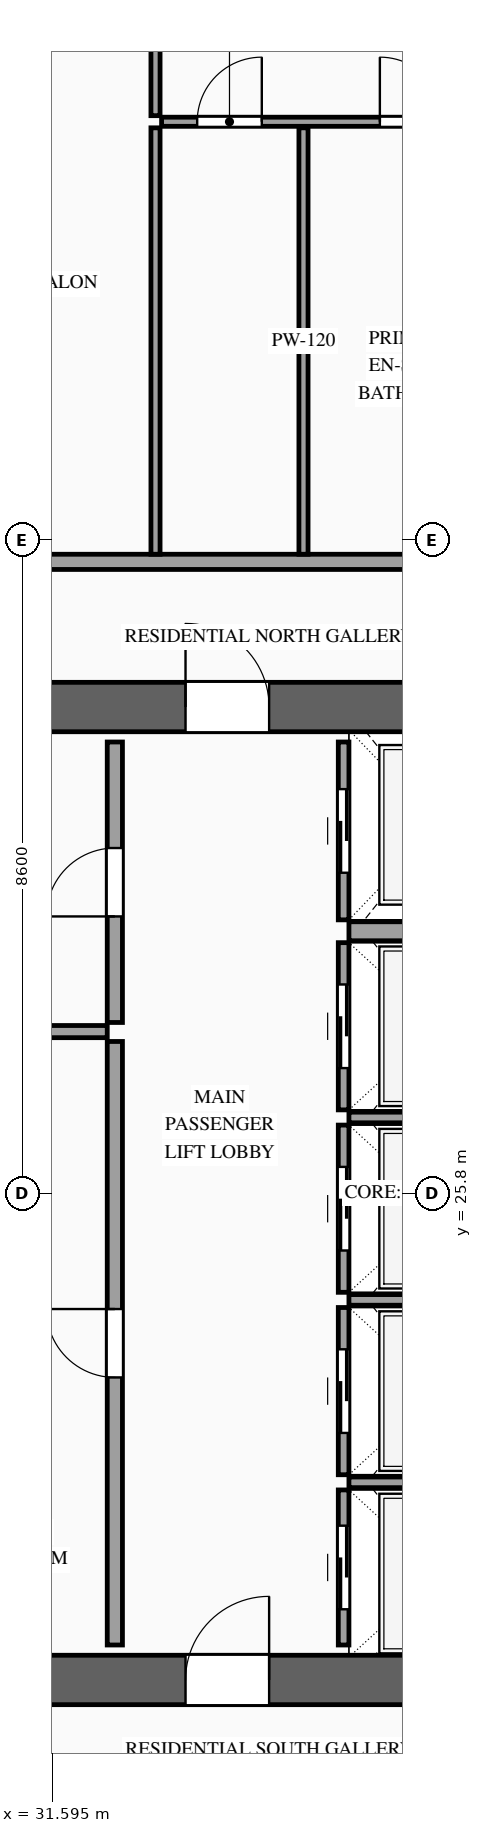
"""IFC4 building model, lengths in metres.
Left out: names, types, materials, properties, quantities, classifications, styles, units other than length and angle.
Written with IfcOpenShell. Run it as: python <this file> out.ifc"""

import sys

from ifc_helpers import new_model, si_unit, direction, frame, frame_2d, origin, place, context, subcontext, project, spatial, rectangle, extrude, source, transform, mapped, element, fill, save


model = new_model("IFC4")
c1 = context("Model", 3, precision=1e-05, world=origin(), true_north=direction((0.0, 1.0)))
c2 = subcontext(c1, "Body", "Model", "MODEL_VIEW")
j1 = project(units=[si_unit("LENGTHUNIT", "METRE"), si_unit("PLANEANGLEUNIT", "RADIAN")], contexts=[c1])
p1 = place(None, origin())
s1 = spatial("IfcSite", under=j1, at=p1, CompositionType="ELEMENT")
p2 = place(p1, origin())
s2 = spatial("IfcBuilding", under=s1, at=p2, CompositionType="ELEMENT")
p3 = place(p2, frame((0.0, 0.0, 198.5)))
s3 = spatial("IfcBuildingStorey", under=s2, at=p3, CompositionType="ELEMENT", Elevation=198.5)
p4 = place(p3, frame((23.475, 19.4, 0.0), z_axis=(0.0, 0.0, 1.0), x_axis=(1.0, 0.0, 0.0)))
e1 = element("IfcWall", 1, at=p4, inside=s3, PredefinedType="SHEAR", context=c2, shape_type="SweptSolid", body=[
    extrude(rectangle(XDim=27.05, YDim=0.65, at=frame_2d((13.525, 0.0))), origin(), (0.0, 0.0, 1.0), 3.5),
])
p5 = place(p4, frame((1.975, 0.0, 0.0)))
e2 = element("IfcOpeningElement", 2, at=p5, cuts=e1, PredefinedType="OPENING", context=c2, shape_type="SweptSolid", body=[
    extrude(rectangle(XDim=1.1, YDim=2.2, at=frame_2d((0.55, 1.1))), frame((0.0, 0.34, 0.0), z_axis=(0.0, -1.0, 0.0), x_axis=(1.0, 0.0, 0.0)), (0.0, 0.0, 1.0), 0.68),
])
p6 = place(p4, frame((9.875, 0.0, 0.0)))
e3 = element("IfcOpeningElement", 3, at=p6, cuts=e1, PredefinedType="OPENING", context=c2, shape_type="SweptSolid", body=[
    extrude(rectangle(XDim=1.1, YDim=2.2, at=frame_2d((0.55, 1.1))), frame((0.0, 0.34, 0.0), z_axis=(0.0, -1.0, 0.0), x_axis=(1.0, 0.0, 0.0)), (0.0, 0.0, 1.0), 0.68),
])
p7 = place(p4, frame((23.075, 0.0, 0.0)))
e4 = element("IfcOpeningElement", 4, at=p7, cuts=e1, PredefinedType="OPENING", context=c2, shape_type="SweptSolid", body=[
    extrude(rectangle(XDim=1.1, YDim=2.2, at=frame_2d((0.55, 1.1))), frame((0.0, 0.34, 0.0), z_axis=(0.0, -1.0, 0.0), x_axis=(1.0, 0.0, 0.0)), (0.0, 0.0, 1.0), 0.68),
])
p8 = place(p4, frame((19.695, 0.0, 0.0)))
e5 = element("IfcOpeningElement", 5, at=p8, cuts=e1, PredefinedType="OPENING", context=c2, shape_type="SweptSolid", body=[
    extrude(rectangle(XDim=0.9, YDim=2.15, at=frame_2d((0.45, 1.075))), frame((0.0, 0.34, 0.0), z_axis=(0.0, -1.0, 0.0), x_axis=(1.0, 0.0, 0.0)), (0.0, 0.0, 1.0), 0.68),
])
p9 = place(p4, frame((18.255, 0.0, 0.0)))
e6 = element("IfcOpeningElement", 6, at=p9, cuts=e1, PredefinedType="OPENING", context=c2, shape_type="SweptSolid", body=[
    extrude(rectangle(XDim=0.9, YDim=2.15, at=frame_2d((0.45, 1.075))), frame((0.0, 0.34, 0.0), z_axis=(0.0, -1.0, 0.0), x_axis=(1.0, 0.0, 0.0)), (0.0, 0.0, 1.0), 0.68),
])
p10 = place(p3, frame((23.475, 32.2, 0.0), z_axis=(0.0, 0.0, 1.0), x_axis=(1.0, 0.0, 0.0)))
e7 = element("IfcWall", 7, at=p10, inside=s3, PredefinedType="SHEAR", context=c2, shape_type="SweptSolid", body=[
    extrude(rectangle(XDim=27.05, YDim=0.65, at=frame_2d((13.525, 0.0))), origin(), (0.0, 0.0, 1.0), 3.5),
])
p11 = place(p10, frame((4.595, 0.0, 0.0)))
e8 = element("IfcOpeningElement", 8, at=p11, cuts=e7, PredefinedType="OPENING", context=c2, shape_type="SweptSolid", body=[
    extrude(rectangle(XDim=0.9, YDim=2.15, at=frame_2d((0.45, 1.075))), frame((0.0, 0.34, 0.0), z_axis=(0.0, -1.0, 0.0), x_axis=(1.0, 0.0, 0.0)), (0.0, 0.0, 1.0), 0.68),
])
p12 = place(p10, frame((9.875, 0.0, 0.0)))
e9 = element("IfcOpeningElement", 9, at=p12, cuts=e7, PredefinedType="OPENING", context=c2, shape_type="SweptSolid", body=[
    extrude(rectangle(XDim=1.1, YDim=2.2, at=frame_2d((0.55, 1.1))), frame((0.0, 0.34, 0.0), z_axis=(0.0, -1.0, 0.0), x_axis=(1.0, 0.0, 0.0)), (0.0, 0.0, 1.0), 0.68),
])
p13 = place(p10, frame((15.725, 0.0, 0.0)))
e10 = element("IfcOpeningElement", 10, at=p13, cuts=e7, PredefinedType="OPENING", context=c2, shape_type="SweptSolid", body=[
    extrude(rectangle(XDim=1.1, YDim=2.2, at=frame_2d((0.55, 1.1))), frame((0.0, 0.34, 0.0), z_axis=(0.0, -1.0, 0.0), x_axis=(1.0, 0.0, 0.0)), (0.0, 0.0, 1.0), 0.68),
])
p14 = place(p10, frame((18.255, 0.0, 0.0)))
e11 = element("IfcOpeningElement", 11, at=p14, cuts=e7, PredefinedType="OPENING", context=c2, shape_type="SweptSolid", body=[
    extrude(rectangle(XDim=0.9, YDim=2.15, at=frame_2d((0.45, 1.075))), frame((0.0, 0.34, 0.0), z_axis=(0.0, -1.0, 0.0), x_axis=(1.0, 0.0, 0.0)), (0.0, 0.0, 1.0), 0.68),
])
p15 = place(p10, frame((19.695, 0.0, 0.0)))
e12 = element("IfcOpeningElement", 12, at=p15, cuts=e7, PredefinedType="OPENING", context=c2, shape_type="SweptSolid", body=[
    extrude(rectangle(XDim=0.9, YDim=2.15, at=frame_2d((0.45, 1.075))), frame((0.0, 0.34, 0.0), z_axis=(0.0, -1.0, 0.0), x_axis=(1.0, 0.0, 0.0)), (0.0, 0.0, 1.0), 0.68),
])
p16 = place(p3, frame((35.43, 19.86, 0.0), z_axis=(0.0, 0.0, 1.0), x_axis=(0.0, 1.0, 0.0)))
e13 = element("IfcWall", 13, at=p16, inside=s3, PredefinedType="SOLIDWALL", context=c2, shape_type="SweptSolid", body=[
    extrude(rectangle(XDim=2.04, YDim=0.14, at=frame_2d((1.02, 0.0))), origin(), (0.0, 0.0, 1.0), 3.28),
])
p17 = place(p16, frame((0.47, 0.0, 0.0)))
e14 = element("IfcOpeningElement", 14, at=p17, cuts=e13, PredefinedType="OPENING", context=c2, shape_type="SweptSolid", body=[
    extrude(rectangle(XDim=1.1, YDim=2.2, at=frame_2d((0.55, 1.1))), frame((0.0, 0.085, 0.0), z_axis=(0.0, -1.0, 0.0), x_axis=(1.0, 0.0, 0.0)), (0.0, 0.0, 1.0), 0.17),
])
m1 = source(origin(), c2, "Body", "SweptSolid", [
    extrude(rectangle(XDim=2.4, YDim=0.14, at=frame_2d((1.2, 0.0))), origin(), (0.0, 0.0, 1.0), 3.28),
])
p18 = place(p3, frame((35.5, 22.0, 0.0), z_axis=(0.0, 0.0, 1.0), x_axis=(1.0, 0.0, 0.0)))
e15 = element("IfcWall", 15, at=p18, inside=s3, PredefinedType="SOLIDWALL", context=c2, shape_type="MappedRepresentation", body=[
    mapped(m1, transform((0.0, 0.0, 0.0), scale=1.0)),
])
p19 = place(p3, frame((35.43, 22.1, 0.0), z_axis=(0.0, 0.0, 1.0), x_axis=(0.0, 1.0, 0.0)))
e16 = element("IfcWall", 16, at=p19, inside=s3, PredefinedType="SOLIDWALL", context=c2, shape_type="SweptSolid", body=[
    extrude(rectangle(XDim=2.2, YDim=0.14, at=frame_2d((1.1, 0.0))), origin(), (0.0, 0.0, 1.0), 3.28),
])
p20 = place(p19, frame((0.55, 0.0, 0.0)))
e17 = element("IfcOpeningElement", 17, at=p20, cuts=e16, PredefinedType="OPENING", context=c2, shape_type="SweptSolid", body=[
    extrude(rectangle(XDim=1.1, YDim=2.2, at=frame_2d((0.55, 1.1))), frame((0.0, 0.085, 0.0), z_axis=(0.0, -1.0, 0.0), x_axis=(1.0, 0.0, 0.0)), (0.0, 0.0, 1.0), 0.17),
])
p21 = place(p3, frame((35.5, 24.4, 0.0), z_axis=(0.0, 0.0, 1.0), x_axis=(1.0, 0.0, 0.0)))
e18 = element("IfcWall", 18, at=p21, inside=s3, PredefinedType="SOLIDWALL", context=c2, shape_type="MappedRepresentation", body=[
    mapped(m1, transform((0.0, 0.0, 0.0), scale=1.0)),
])
p22 = place(p3, frame((35.43, 24.5, 0.0), z_axis=(0.0, 0.0, 1.0), x_axis=(0.0, 1.0, 0.0)))
e19 = element("IfcWall", 19, at=p22, inside=s3, PredefinedType="SOLIDWALL", context=c2, shape_type="SweptSolid", body=[
    extrude(rectangle(XDim=2.2, YDim=0.14, at=frame_2d((1.1, 0.0))), origin(), (0.0, 0.0, 1.0), 3.28),
])
p23 = place(p22, frame((0.55, 0.0, 0.0)))
e20 = element("IfcOpeningElement", 20, at=p23, cuts=e19, PredefinedType="OPENING", context=c2, shape_type="SweptSolid", body=[
    extrude(rectangle(XDim=1.1, YDim=2.2, at=frame_2d((0.55, 1.1))), frame((0.0, 0.085, 0.0), z_axis=(0.0, -1.0, 0.0), x_axis=(1.0, 0.0, 0.0)), (0.0, 0.0, 1.0), 0.17),
])
p24 = place(p3, frame((35.5, 26.8, 0.0), z_axis=(0.0, 0.0, 1.0), x_axis=(1.0, 0.0, 0.0)))
e21 = element("IfcWall", 21, at=p24, inside=s3, PredefinedType="SOLIDWALL", context=c2, shape_type="MappedRepresentation", body=[
    mapped(m1, transform((0.0, 0.0, 0.0), scale=1.0)),
])
p25 = place(p3, frame((35.43, 26.9, 0.0), z_axis=(0.0, 0.0, 1.0), x_axis=(0.0, 1.0, 0.0)))
e22 = element("IfcWall", 22, at=p25, inside=s3, PredefinedType="SOLIDWALL", context=c2, shape_type="SweptSolid", body=[
    extrude(rectangle(XDim=2.2, YDim=0.14, at=frame_2d((1.1, 0.0))), origin(), (0.0, 0.0, 1.0), 3.28),
])
p26 = place(p25, frame((0.55, 0.0, 0.0)))
e23 = element("IfcOpeningElement", 23, at=p26, cuts=e22, PredefinedType="OPENING", context=c2, shape_type="SweptSolid", body=[
    extrude(rectangle(XDim=1.1, YDim=2.2, at=frame_2d((0.55, 1.1))), frame((0.0, 0.085, 0.0), z_axis=(0.0, -1.0, 0.0), x_axis=(1.0, 0.0, 0.0)), (0.0, 0.0, 1.0), 0.17),
])
p27 = place(p3, frame((35.43, 29.4, 0.0), z_axis=(0.0, 0.0, 1.0), x_axis=(0.0, 1.0, 0.0)))
e24 = element("IfcWall", 24, at=p27, inside=s3, PredefinedType="SOLIDWALL", context=c2, shape_type="SweptSolid", body=[
    extrude(rectangle(XDim=2.34, YDim=0.14, at=frame_2d((1.17, 0.0))), origin(), (0.0, 0.0, 1.0), 3.28),
])
p28 = place(p27, frame((0.62, 0.0, 0.0)))
e25 = element("IfcOpeningElement", 25, at=p28, cuts=e24, PredefinedType="OPENING", context=c2, shape_type="SweptSolid", body=[
    extrude(rectangle(XDim=1.1, YDim=2.2, at=frame_2d((0.55, 1.1))), frame((0.0, 0.085, 0.0), z_axis=(0.0, -1.0, 0.0), x_axis=(1.0, 0.0, 0.0)), (0.0, 0.0, 1.0), 0.17),
])
m2 = source(origin(), c2, "Body", "SweptSolid", [
    extrude(rectangle(XDim=2.4, YDim=0.25, at=frame_2d((1.2, 0.0))), origin(), (0.0, 0.0, 1.0), 3.28),
])
p29 = place(p3, frame((35.5, 29.25, 0.0), z_axis=(0.0, 0.0, 1.0), x_axis=(1.0, 0.0, 0.0)))
e26 = element("IfcWall", 26, at=p29, inside=s3, PredefinedType="SOLIDWALL", context=c2, shape_type="MappedRepresentation", body=[
    mapped(m2, transform((0.0, 0.0, 0.0), scale=1.0)),
])
p30 = place(p3, frame((32.42, 19.86, 0.0), z_axis=(0.0, 0.0, 1.0), x_axis=(0.0, 1.0, 0.0)))
e27 = element("IfcWall", 27, at=p30, inside=s3, PredefinedType="PARTITIONING", context=c2, shape_type="SweptSolid", body=[
    extrude(rectangle(XDim=7.94, YDim=0.2, at=frame_2d((3.97, 0.0))), origin(), (0.0, 0.0, 1.0), 3.28),
])
p31 = place(p30, frame((3.52, 0.0, 0.0)))
e28 = element("IfcOpeningElement", 28, at=p31, cuts=e27, PredefinedType="OPENING", context=c2, shape_type="SweptSolid", body=[
    extrude(rectangle(XDim=0.9, YDim=2.15, at=frame_2d((0.45, 1.075))), frame((0.0, 0.115, 0.0), z_axis=(0.0, -1.0, 0.0), x_axis=(1.0, 0.0, 0.0)), (0.0, 0.0, 1.0), 0.23),
])
p32 = place(p3, frame((32.42, 28.05, 0.0), z_axis=(0.0, 0.0, 1.0), x_axis=(0.0, 1.0, 0.0)))
e29 = element("IfcWall", 29, at=p32, inside=s3, PredefinedType="PARTITIONING", context=c2, shape_type="SweptSolid", body=[
    extrude(rectangle(XDim=3.69, YDim=0.2, at=frame_2d((1.845, 0.0))), origin(), (0.0, 0.0, 1.0), 3.28),
])
p33 = place(p32, frame((1.395, 0.0, 0.0)))
e30 = element("IfcOpeningElement", 30, at=p33, cuts=e29, PredefinedType="OPENING", context=c2, shape_type="SweptSolid", body=[
    extrude(rectangle(XDim=0.9, YDim=2.15, at=frame_2d((0.45, 1.075))), frame((0.0, 0.115, 0.0), z_axis=(0.0, -1.0, 0.0), x_axis=(1.0, 0.0, 0.0)), (0.0, 0.0, 1.0), 0.23),
])
m3 = source(origin(), c2, "Body", "SweptSolid", [
    extrude(rectangle(XDim=2.47, YDim=0.16, at=frame_2d((1.235, 0.0))), origin(), (0.0, 0.0, 1.0), 3.28),
])
p34 = place(p3, frame((29.85, 27.93, 0.0), z_axis=(0.0, 0.0, 1.0), x_axis=(1.0, 0.0, 0.0)))
e31 = element("IfcWall", 31, at=p34, inside=s3, PredefinedType="PARTITIONING", context=c2, shape_type="MappedRepresentation", body=[
    mapped(m3, transform((0.0, 0.0, 0.0), scale=1.0)),
])
p35 = place(p3, frame((17.94, 34.11, 0.0), z_axis=(0.0, 0.0, 1.0), x_axis=(1.0, 0.0, 0.0)))
e32 = element("IfcWall", 32, at=p35, inside=s3, PredefinedType="PARTITIONING", context=c2, shape_type="SweptSolid", body=[
    extrude(rectangle(XDim=19.742, YDim=0.2, at=frame_2d((9.871, 0.0))), origin(), (0.0, 0.0, 1.0), 3.28),
])
p36 = place(p35, frame((11.915, 0.0, 0.0)))
e33 = element("IfcOpeningElement", 33, at=p36, cuts=e32, PredefinedType="OPENING", context=c2, shape_type="SweptSolid", body=[
    extrude(rectangle(XDim=1.0, YDim=2.2, at=frame_2d((0.5, 1.1))), frame((0.0, 0.115, 0.0), z_axis=(0.0, -1.0, 0.0), x_axis=(1.0, 0.0, 0.0)), (0.0, 0.0, 1.0), 0.23),
])
m4 = source(origin(), c2, "Body", "SweptSolid", [
    extrude(rectangle(XDim=5.61, YDim=0.12, at=frame_2d((2.805, 0.0))), origin(), (0.0, 0.0, 1.0), 3.28),
])
for number, where, z_axis, x_axis in (
    (34, (34.902, 34.21, 0.0), (0.0, 0.0, 1.0), (0.0, 1.0, 0.0)),
    (35, (32.955, 34.21, 0.0), (0.0, 0.0, 1.0), (0.0, 1.0, 0.0)),
):
    element("IfcWall", number, at=place(p3, frame(where, z_axis=z_axis, x_axis=x_axis)), inside=s3, PredefinedType="PARTITIONING", context=c2, shape_type="MappedRepresentation", body=[
        mapped(m4, transform((0.0, 0.0, 0.0), scale=1.0)),
    ])
p37 = place(p3, frame((33.035, 39.9, 0.0), z_axis=(0.0, 0.0, 1.0), x_axis=(1.0, 0.0, 0.0)))
e36 = element("IfcWall", 36, at=p37, inside=s3, PredefinedType="PARTITIONING", context=c2, shape_type="SweptSolid", body=[
    extrude(rectangle(XDim=4.647, YDim=0.12, at=frame_2d((2.323, 0.0))), origin(), (0.0, 0.0, 1.0), 2.875),
])
p38 = place(p37, frame((2.872, 0.0, 0.0)))
e37 = element("IfcOpeningElement", 37, at=p38, cuts=e36, PredefinedType="OPENING", context=c2, shape_type="SweptSolid", body=[
    extrude(rectangle(XDim=0.85, YDim=2.1, at=frame_2d((0.425, 1.05))), frame((0.0, 0.075, 0.0), z_axis=(0.0, -1.0, 0.0), x_axis=(1.0, 0.0, 0.0)), (0.0, 0.0, 1.0), 0.15),
])
p39 = place(p37, frame((0.469, 0.0, 0.0)))
e38 = element("IfcOpeningElement", 38, at=p39, cuts=e36, PredefinedType="OPENING", context=c2, shape_type="SweptSolid", body=[
    extrude(rectangle(XDim=0.85, YDim=2.1, at=frame_2d((0.425, 1.05))), frame((0.0, 0.075, 0.0), z_axis=(0.0, -1.0, 0.0), x_axis=(1.0, 0.0, 0.0)), (0.0, 0.0, 1.0), 0.15),
])
p40 = place(p3, frame((32.955, 39.98, 0.0), z_axis=(0.0, 0.0, 1.0), x_axis=(0.0, 1.0, 0.0)))
e39 = element("IfcWall", 39, at=p40, inside=s3, PredefinedType="PARTITIONING", context=c2, shape_type="SweptSolid", body=[
    extrude(rectangle(XDim=7.77, YDim=0.12, at=frame_2d((3.885, 0.0))), origin(), (0.0, 0.0, 1.0), 3.28),
])
p41 = place(p40, frame((3.435, 0.0, 0.0)))
e40 = element("IfcOpeningElement", 40, at=p41, cuts=e39, PredefinedType="OPENING", context=c2, shape_type="SweptSolid", body=[
    extrude(rectangle(XDim=0.9, YDim=2.15, at=frame_2d((0.45, 1.075))), frame((0.0, 0.075, 0.0), z_axis=(0.0, -1.0, 0.0), x_axis=(1.0, 0.0, 0.0)), (0.0, 0.0, 1.0), 0.15),
])
m5 = source(origin(), c2, "Body", "SweptSolid", [
    extrude(rectangle(XDim=1.1, YDim=2.2, at=frame_2d((0.55, 1.1))), frame((0.0, 0.025, 0.0), z_axis=(0.0, -1.0, 0.0), x_axis=(1.0, 0.0, 0.0)), (0.0, 0.0, 1.0), 0.05),
])
p42 = place(p17, origin())
e41 = element("IfcDoor", 41, at=p42, inside=s3, OperationType="SLIDING_TO_RIGHT", PredefinedType="DOOR", context=c2, shape_type="MappedRepresentation", body=[
    mapped(m5, transform((0.0, 0.0, 0.0), scale=1.0)),
])
fill(e14, e41)
p43 = place(p20, origin())
e42 = element("IfcDoor", 42, at=p43, inside=s3, OperationType="SLIDING_TO_LEFT", PredefinedType="DOOR", context=c2, shape_type="MappedRepresentation", body=[
    mapped(m5, transform((0.0, 0.0, 0.0), scale=1.0)),
])
fill(e17, e42)
p44 = place(p23, origin())
e43 = element("IfcDoor", 43, at=p44, inside=s3, OperationType="SLIDING_TO_RIGHT", PredefinedType="DOOR", context=c2, shape_type="MappedRepresentation", body=[
    mapped(m5, transform((0.0, 0.0, 0.0), scale=1.0)),
])
fill(e20, e43)
p45 = place(p26, origin())
e44 = element("IfcDoor", 44, at=p45, inside=s3, OperationType="SLIDING_TO_LEFT", PredefinedType="DOOR", context=c2, shape_type="MappedRepresentation", body=[
    mapped(m5, transform((0.0, 0.0, 0.0), scale=1.0)),
])
fill(e23, e44)
p46 = place(p28, origin())
e45 = element("IfcDoor", 45, at=p46, inside=s3, OperationType="SLIDING_TO_RIGHT", PredefinedType="DOOR", context=c2, shape_type="MappedRepresentation", body=[
    mapped(m5, transform((0.0, 0.0, 0.0), scale=1.0)),
])
fill(e25, e45)
m6 = source(origin(), c2, "Body", "SweptSolid", [
    extrude(rectangle(XDim=1.1, YDim=2.2, at=frame_2d((0.55, 1.1))), frame((0.0, 0.025, 0.0), z_axis=(0.0, -1.0, 0.0), x_axis=(1.0, 0.0, 0.0)), (0.0, 0.0, 1.0), 0.05),
])
p47 = place(p6, origin())
e46 = element("IfcDoor", 46, at=p47, inside=s3, OperationType="SINGLE_SWING_RIGHT", PredefinedType="DOOR", context=c2, shape_type="MappedRepresentation", body=[
    mapped(m6, transform((0.0, 0.0, 0.0), scale=1.0)),
])
fill(e3, e46)
p48 = place(p12, origin())
e47 = element("IfcDoor", 47, at=p48, inside=s3, OperationType="SINGLE_SWING_LEFT", PredefinedType="DOOR", context=c2, shape_type="MappedRepresentation", body=[
    mapped(m6, transform((0.0, 0.0, 0.0), scale=1.0)),
])
fill(e9, e47)
m7 = source(origin(), c2, "Body", "SweptSolid", [
    extrude(rectangle(XDim=0.9, YDim=2.15, at=frame_2d((0.45, 1.075))), frame((0.0, 0.025, 0.0), z_axis=(0.0, -1.0, 0.0), x_axis=(1.0, 0.0, 0.0)), (0.0, 0.0, 1.0), 0.05),
])
p49 = place(p31, origin())
e48 = element("IfcDoor", 48, at=p49, inside=s3, OperationType="SINGLE_SWING_RIGHT", PredefinedType="DOOR", context=c2, shape_type="MappedRepresentation", body=[
    mapped(m7, transform((0.0, 0.0, 0.0), scale=1.0)),
])
fill(e28, e48)
p50 = place(p33, origin())
e49 = element("IfcDoor", 49, at=p50, inside=s3, OperationType="SINGLE_SWING_LEFT", PredefinedType="DOOR", context=c2, shape_type="MappedRepresentation", body=[
    mapped(m7, transform((0.0, 0.0, 0.0), scale=1.0)),
])
fill(e30, e49)
m8 = source(origin(), c2, "Body", "SweptSolid", [
    extrude(rectangle(XDim=0.85, YDim=2.1, at=frame_2d((0.425, 1.05))), frame((0.0, 0.025, 0.0), z_axis=(0.0, -1.0, 0.0), x_axis=(1.0, 0.0, 0.0)), (0.0, 0.0, 1.0), 0.05),
])
p51 = place(p38, origin())
e50 = element("IfcDoor", 50, at=p51, inside=s3, OperationType="SINGLE_SWING_LEFT", PredefinedType="DOOR", context=c2, shape_type="MappedRepresentation", body=[
    mapped(m8, transform((0.0, 0.0, 0.0), scale=1.0)),
])
fill(e37, e50)
p52 = place(p39, origin())
e51 = element("IfcDoor", 51, at=p52, inside=s3, OperationType="SINGLE_SWING_RIGHT", PredefinedType="DOOR", context=c2, shape_type="MappedRepresentation", body=[
    mapped(m8, transform((0.0, 0.0, 0.0), scale=1.0)),
])
fill(e38, e51)
save(model, sys.argv[1])
